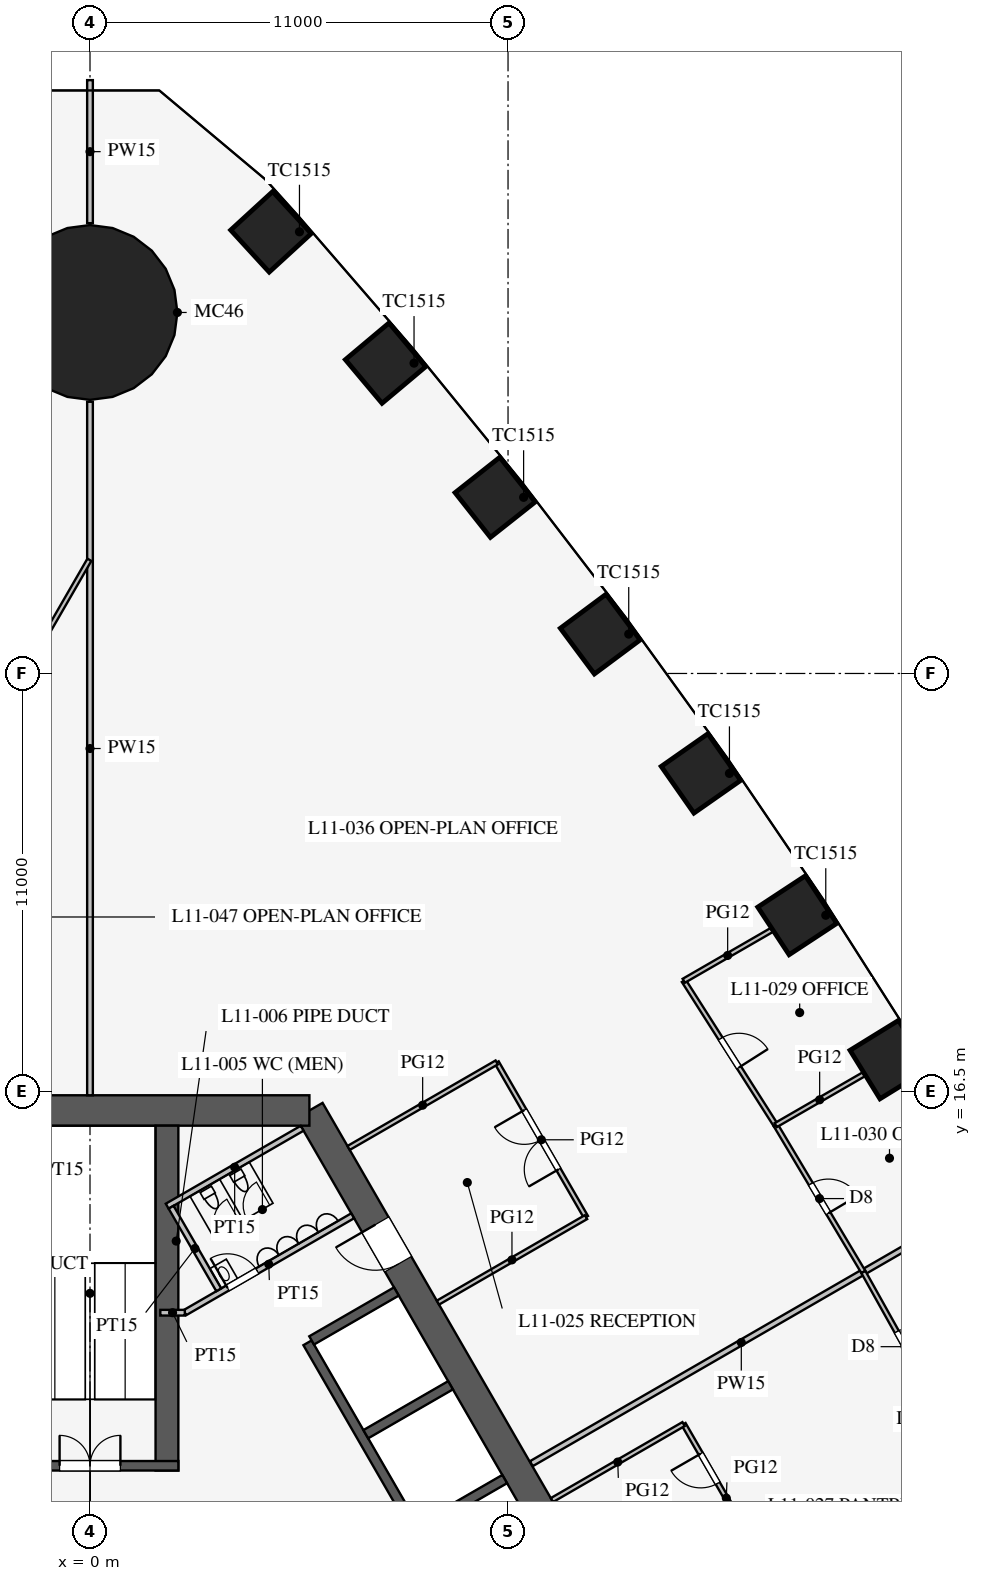
"""IFC4 building model, lengths in metres.
Left out: names, types, materials, properties, quantities, classifications, styles, units other than length and angle.
Written with IfcOpenShell. Run it as: python <this file> out.ifc"""

import sys

from ifc_helpers import new_model, si_unit, direction, frame, frame_2d, origin, origin_2d, place, context, subcontext, project, spatial, rectangle, circle, extrude, element, fill, save


model = new_model("IFC4")
c1 = context("Model", 3, precision=1e-05, world=origin(), true_north=direction((0.0, 1.0)))
c2 = subcontext(c1, "Body", "Model", "MODEL_VIEW")
j1 = project(units=[si_unit("LENGTHUNIT", "METRE"), si_unit("PLANEANGLEUNIT", "RADIAN")], contexts=[c1])
p1 = place(None, origin())
s1 = spatial("IfcSite", under=j1, at=p1, CompositionType="ELEMENT")
p2 = place(p1, origin())
s2 = spatial("IfcBuilding", under=s1, at=p2, CompositionType="ELEMENT")
p3 = place(p2, frame((0.0, 0.0, 50.1)))
s3 = spatial("IfcBuildingStorey", under=s2, at=p3, CompositionType="ELEMENT", Elevation=50.1)
for number, where, z_axis, x_axis in (
    (1, (21.031, 17.339, 0.0), (0.0, 0.0, 1.0), (-0.525, 0.851, 0.0)),
    (2, (18.611, 21.137, 0.0), (0.0, 0.0, 1.0), (-0.549, 0.836, 0.0)),
    (3, (16.076, 24.87, 0.0), (0.0, 0.0, 1.0), (-0.574, 0.819, 0.0)),
    (4, (13.426, 28.536, 0.0), (0.0, 0.0, 1.0), (-0.597, 0.802, 0.0)),
    (5, (10.66, 32.135, 0.0), (0.0, 0.0, 1.0), (-0.62, 0.784, 0.0)),
    (6, (7.776, 35.667, 0.0), (0.0, 0.0, 1.0), (-0.643, 0.766, 0.0)),
    (7, (4.762, 39.122, 0.0), (0.0, 0.0, 1.0), (-0.676, 0.737, 0.0)),
):
    element("IfcColumn", number, at=place(p3, frame(where, z_axis=z_axis, x_axis=x_axis)), inside=s3, PredefinedType="COLUMN", context=c2, shape_type="SweptSolid", body=[
        extrude(rectangle(XDim=1.5, YDim=1.5, at=origin_2d()), origin(), (0.0, 0.0, 1.0), 4.2),
    ])
p4 = place(p3, frame((0.0, 37.0, 0.0), z_axis=(0.0, 0.0, 1.0), x_axis=(1.0, 0.0, 0.0)))
e8 = element("IfcColumn", 8, at=p4, inside=s3, PredefinedType="COLUMN", context=c2, shape_type="SweptSolid", body=[
    extrude(circle(Radius=2.3, at=origin_2d()), origin(), (0.0, 0.0, 1.0), 4.2),
])
p5 = place(p3, frame((16.743, -3.0, 0.0), z_axis=(0.0, 0.0, 1.0), x_axis=(-0.500002442456, 0.866023993627, 0.0)))
e9 = element("IfcWall", 9, at=p5, inside=s3, PredefinedType="SHEAR", context=c2, shape_type="SweptSolid", body=[
    extrude(rectangle(XDim=21.939, YDim=0.8, at=frame_2d((10.97, 0.0))), origin(), (0.0, 0.0, 1.0), 4.2),
])
p6 = place(p5, frame((17.27, 0.0, 0.0)))
e10 = element("IfcOpeningElement", 10, at=p6, cuts=e9, PredefinedType="OPENING", context=c2, shape_type="SweptSolid", body=[
    extrude(rectangle(XDim=1.2, YDim=2.1, at=frame_2d((0.6, 1.05))), frame((0.0, 0.41, 0.0), z_axis=(0.0, -1.0, 0.0), x_axis=(1.0, 0.0, 0.0)), (0.0, 0.0, 1.0), 0.82),
])
p7 = place(p5, frame((3.47, 0.0, 0.0)))
e11 = element("IfcOpeningElement", 11, at=p7, cuts=e9, PredefinedType="OPENING", context=c2, shape_type="SweptSolid", body=[
    extrude(rectangle(XDim=1.2, YDim=2.1, at=frame_2d((0.6, 1.05))), frame((0.0, 0.41, 0.0), z_axis=(0.0, -1.0, 0.0), x_axis=(1.0, 0.0, 0.0)), (0.0, 0.0, 1.0), 0.82),
])
p8 = place(p3, frame((5.773, 16.0, 0.0), z_axis=(0.0, 0.0, 1.0), x_axis=(-1.0, 0.0, 0.0)))
e12 = element("IfcWall", 12, at=p8, inside=s3, PredefinedType="SHEAR", context=c2, shape_type="SweptSolid", body=[
    extrude(rectangle(XDim=11.547, YDim=0.8, at=frame_2d((5.773, 0.0))), origin(), (0.0, 0.0, 1.0), 4.2),
])
p9 = place(p3, frame((11.424, 0.014, 0.0), z_axis=(0.0, 0.0, 1.0), x_axis=(-0.500001763848, 0.866024385424, 0.0)))
e13 = element("IfcWall", 13, at=p9, inside=s3, PredefinedType="SHEAR", context=c2, shape_type="SweptSolid", body=[
    extrude(rectangle(XDim=11.4, YDim=0.25, at=frame_2d((5.7, 0.0))), origin(), (0.0, 0.0, 1.0), 4.2),
])
for number, where, z_axis, x_axis in (
    (14, (8.682, 5.012, 0.0), (0.0, 0.0, 1.0), (0.866, 0.5, 0.0)),
    (15, (7.257, 7.481, 0.0), (0.0, 0.0, 1.0), (0.866, 0.5, 0.0)),
):
    element("IfcWall", number, at=place(p3, frame(where, z_axis=z_axis, x_axis=x_axis)), inside=s3, PredefinedType="SHEAR", context=c2, shape_type="SweptSolid", body=[
        extrude(rectangle(XDim=2.575, YDim=0.25, at=frame_2d((1.288, 0.0))), origin(), (0.0, 0.0, 1.0), 4.2),
    ])
p10 = place(p3, frame((5.832, 9.949, 0.0), z_axis=(0.0, 0.0, 1.0), x_axis=(0.866029291668, 0.499993265928, 0.0)))
e16 = element("IfcWall", 16, at=p10, inside=s3, PredefinedType="SHEAR", context=c2, shape_type="SweptSolid", body=[
    extrude(rectangle(XDim=2.575, YDim=0.25, at=frame_2d((1.288, 0.0))), origin(), (0.0, 0.0, 1.0), 4.2),
])
p11 = place(p3, frame((2.025, 6.525, 0.0), z_axis=(0.0, 0.0, 1.0), x_axis=(0.0, 1.0, 0.0)))
e17 = element("IfcWall", 17, at=p11, inside=s3, PredefinedType="SHEAR", context=c2, shape_type="SweptSolid", body=[
    extrude(rectangle(XDim=9.075, YDim=0.6, at=frame_2d((4.538, 0.0))), origin(), (0.0, 0.0, 1.0), 4.2),
])
p12 = place(p3, frame((2.325, 6.65, 0.0), z_axis=(0.0, 0.0, 1.0), x_axis=(-1.0, 0.0, 0.0)))
e18 = element("IfcWall", 18, at=p12, inside=s3, PredefinedType="SHEAR", context=c2, shape_type="SweptSolid", body=[
    extrude(rectangle(XDim=4.65, YDim=0.25, at=frame_2d((2.325, 0.0))), origin(), (0.0, 0.0, 1.0), 4.2),
])
p13 = place(p12, frame((1.525, 0.0, 0.0)))
e19 = element("IfcOpeningElement", 19, at=p13, cuts=e18, PredefinedType="OPENING", context=c2, shape_type="SweptSolid", body=[
    extrude(rectangle(XDim=1.6, YDim=2.1, at=frame_2d((0.8, 1.05))), frame((0.0, 0.135, 0.0), z_axis=(0.0, -1.0, 0.0), x_axis=(1.0, 0.0, 0.0)), (0.0, 0.0, 1.0), 0.27),
])
p14 = place(p3, frame((2.495, 10.678, 0.0), z_axis=(0.0, 0.0, 1.0), x_axis=(0.86602216432, 0.500005610874, 0.0)))
e20 = element("IfcWall", 20, at=p14, inside=s3, PredefinedType="PARTITIONING", context=c2, shape_type="SweptSolid", body=[
    extrude(rectangle(XDim=5.1, YDim=0.15, at=frame_2d((2.55, 0.0))), origin(), (0.0, 0.0, 1.0), 4.0),
])
p15 = place(p14, frame((1.3, 0.0, 0.0)))
e21 = element("IfcOpeningElement", 21, at=p15, cuts=e20, PredefinedType="OPENING", context=c2, shape_type="SweptSolid", body=[
    extrude(rectangle(XDim=0.9, YDim=2.1, at=frame_2d((0.45, 1.05))), frame((0.0, 0.085, 0.0), z_axis=(0.0, -1.0, 0.0), x_axis=(1.0, 0.0, 0.0)), (0.0, 0.0, 1.0), 0.17),
])
p16 = place(p3, frame((2.495, 10.678, 0.0), z_axis=(0.0, 0.0, 1.0), x_axis=(-1.0, 0.0, 0.0)))
e22 = element("IfcWall", 22, at=p16, inside=s3, PredefinedType="PARTITIONING", context=c2, shape_type="SweptSolid", body=[
    extrude(rectangle(XDim=0.645, YDim=0.15, at=frame_2d((0.323, 0.0))), origin(), (0.0, 0.0, 1.0), 4.0),
])
p17 = place(p3, frame((2.031, 13.482, 0.0), z_axis=(0.0, 0.0, 1.0), x_axis=(0.866050731258, 0.499956128963, 0.0)))
e23 = element("IfcWall", 23, at=p17, inside=s3, PredefinedType="PARTITIONING", context=c2, shape_type="SweptSolid", body=[
    extrude(rectangle(XDim=4.1, YDim=0.15, at=frame_2d((2.05, 0.0))), origin(), (0.0, 0.0, 1.0), 4.0),
])
p18 = place(p3, frame((3.389, 11.281, 0.0), z_axis=(0.0, 0.0, 1.0), x_axis=(-0.499989096993, 0.866031698547, 0.0)))
e24 = element("IfcWall", 24, at=p18, inside=s3, PredefinedType="PARTITIONING", context=c2, shape_type="SweptSolid", body=[
    extrude(rectangle(XDim=2.51, YDim=0.15, at=frame_2d((1.255, 0.0))), origin(), (0.0, 0.0, 1.0), 4.0),
])
p19 = place(p3, frame((0.0, 16.4, 0.0), z_axis=(0.0, 0.0, 1.0), x_axis=(0.0, 1.0, 0.0)))
e25 = element("IfcWall", 25, at=p19, inside=s3, PredefinedType="PARTITIONING", context=c2, shape_type="SweptSolid", body=[
    extrude(rectangle(XDim=18.25, YDim=0.15, at=frame_2d((9.125, 0.0))), origin(), (0.0, 0.0, 1.0), 2.3),
])
p20 = place(p3, frame((0.0, 39.35, 0.0), z_axis=(0.0, 0.0, 1.0), x_axis=(0.0, 1.0, 0.0)))
e26 = element("IfcWall", 26, at=p20, inside=s3, PredefinedType="PARTITIONING", context=c2, shape_type="SweptSolid", body=[
    extrude(rectangle(XDim=3.764, YDim=0.15, at=frame_2d((1.882, 0.0))), origin(), (0.0, 0.0, 1.0), 2.3),
])
p21 = place(p3, frame((11.613, 6.705, 0.0), z_axis=(0.0, 0.0, 1.0), x_axis=(0.86602785495, 0.499995754432, 0.0)))
e27 = element("IfcWall", 27, at=p21, inside=s3, PredefinedType="PARTITIONING", context=c2, shape_type="SweptSolid", body=[
    extrude(rectangle(XDim=12.759, YDim=0.15, at=frame_2d((6.379, 0.0))), origin(), (0.0, 0.0, 1.0), 3.2),
])
p22 = place(p3, frame((13.052, 13.194, 0.0), z_axis=(0.0, 0.0, 1.0), x_axis=(-0.499977259774, 0.866038532462, 0.0)))
e28 = element("IfcWall", 28, at=p22, inside=s3, PredefinedType="PARTITIONING", context=c2, shape_type="SweptSolid", body=[
    extrude(rectangle(XDim=4.7, YDim=0.12, at=frame_2d((2.35, 0.0))), origin(), (0.0, 0.0, 1.0), 2.9),
])
p23 = place(p22, frame((1.45, 0.0, 0.15)))
e29 = element("IfcOpeningElement", 29, at=p23, cuts=e28, PredefinedType="OPENING", context=c2, shape_type="SweptSolid", body=[
    extrude(rectangle(XDim=1.8, YDim=2.1, at=frame_2d((0.9, 1.05))), frame((0.0, 0.07, 0.0), z_axis=(0.0, -1.0, 0.0), x_axis=(1.0, 0.0, 0.0)), (0.0, 0.0, 1.0), 0.14),
])
p24 = place(p3, frame((16.969, 5.409, 0.0), z_axis=(0.0, 0.0, 1.0), x_axis=(-0.499980770555, 0.866036505625, 0.0)))
e30 = element("IfcWall", 30, at=p24, inside=s3, PredefinedType="PARTITIONING", context=c2, shape_type="SweptSolid", body=[
    extrude(rectangle(XDim=2.7, YDim=0.12, at=frame_2d((1.35, 0.0))), origin(), (0.0, 0.0, 1.0), 2.9),
])
p25 = place(p24, frame((0.9, 0.0, 0.15)))
e31 = element("IfcOpeningElement", 31, at=p25, cuts=e30, PredefinedType="OPENING", context=c2, shape_type="SweptSolid", body=[
    extrude(rectangle(XDim=0.9, YDim=2.1, at=frame_2d((0.45, 1.05))), frame((0.0, 0.07, 0.0), z_axis=(0.0, -1.0, 0.0), x_axis=(1.0, 0.0, 0.0)), (0.0, 0.0, 1.0), 0.14),
])
p26 = place(p3, frame((9.155, 10.944, 0.0), z_axis=(0.0, 0.0, 1.0), x_axis=(0.866017533419, 0.500013631625, 0.0)))
e32 = element("IfcWall", 32, at=p26, inside=s3, PredefinedType="PARTITIONING", context=c2, shape_type="SweptSolid", body=[
    extrude(rectangle(XDim=4.5, YDim=0.12, at=frame_2d((2.25, 0.0))), origin(), (0.0, 0.0, 1.0), 2.9),
])
p27 = place(p3, frame((6.805, 15.014, 0.0), z_axis=(0.0, 0.0, 1.0), x_axis=(0.866031096941, 0.499990139034, 0.0)))
e33 = element("IfcWall", 33, at=p27, inside=s3, PredefinedType="PARTITIONING", context=c2, shape_type="SweptSolid", body=[
    extrude(rectangle(XDim=4.5, YDim=0.12, at=frame_2d((2.25, 0.0))), origin(), (0.0, 0.0, 1.0), 2.9),
])
p28 = place(p3, frame((12.155, 5.747, 0.0), z_axis=(0.0, 0.0, 1.0), x_axis=(0.866026010844, 0.49999894854, 0.0)))
e34 = element("IfcWall", 34, at=p28, inside=s3, PredefinedType="PARTITIONING", context=c2, shape_type="SweptSolid", body=[
    extrude(rectangle(XDim=4.0, YDim=0.12, at=frame_2d((2.0, 0.0))), origin(), (0.0, 0.0, 1.0), 2.9),
])
p29 = place(p3, frame((20.351, 11.749, 0.0), z_axis=(0.0, 0.0, 1.0), x_axis=(-0.51252396108, 0.858672923364, 0.0)))
e35 = element("IfcWall", 35, at=p29, inside=s3, PredefinedType="PARTITIONING", context=c2, shape_type="SweptSolid", body=[
    extrude(rectangle(XDim=4.5, YDim=0.12, at=frame_2d((2.25, 0.0))), origin(), (0.0, 0.0, 1.0), 2.9),
])
p30 = place(p29, frame((1.8, 0.0, 0.15)))
e36 = element("IfcOpeningElement", 36, at=p30, cuts=e35, PredefinedType="OPENING", context=c2, shape_type="SweptSolid", body=[
    extrude(rectangle(XDim=0.9, YDim=2.1, at=frame_2d((0.45, 1.05))), frame((0.0, 0.07, 0.0), z_axis=(0.0, -1.0, 0.0), x_axis=(1.0, 0.0, 0.0)), (0.0, 0.0, 1.0), 0.14),
])
p31 = place(p3, frame((18.044, 15.614, 0.0), z_axis=(0.0, 0.0, 1.0), x_axis=(-0.537243691336, 0.843427066272, 0.0)))
e37 = element("IfcWall", 37, at=p31, inside=s3, PredefinedType="PARTITIONING", context=c2, shape_type="SweptSolid", body=[
    extrude(rectangle(XDim=4.504, YDim=0.12, at=frame_2d((2.252, 0.0))), origin(), (0.0, 0.0, 1.0), 2.9),
])
p32 = place(p31, frame((1.8, 0.0, 0.15)))
e38 = element("IfcOpeningElement", 38, at=p32, cuts=e37, PredefinedType="OPENING", context=c2, shape_type="SweptSolid", body=[
    extrude(rectangle(XDim=0.9, YDim=2.1, at=frame_2d((0.45, 1.05))), frame((0.0, 0.07, 0.0), z_axis=(0.0, -1.0, 0.0), x_axis=(1.0, 0.0, 0.0)), (0.0, 0.0, 1.0), 0.14),
])
p33 = place(p3, frame((22.544, 7.82, 0.0), z_axis=(0.0, 0.0, 1.0), x_axis=(-0.487373854787, 0.873193406795, 0.0)))
e39 = element("IfcWall", 39, at=p33, inside=s3, PredefinedType="PARTITIONING", context=c2, shape_type="SweptSolid", body=[
    extrude(rectangle(XDim=4.5, YDim=0.12, at=frame_2d((2.25, 0.0))), origin(), (0.0, 0.0, 1.0), 2.9),
])
p34 = place(p33, frame((1.8, 0.0, 0.15)))
e40 = element("IfcOpeningElement", 40, at=p34, cuts=e39, PredefinedType="OPENING", context=c2, shape_type="SweptSolid", body=[
    extrude(rectangle(XDim=0.9, YDim=2.1, at=frame_2d((0.45, 1.05))), frame((0.0, 0.07, 0.0), z_axis=(0.0, -1.0, 0.0), x_axis=(1.0, 0.0, 0.0)), (0.0, 0.0, 1.0), 0.14),
])
p35 = place(p3, frame((18.044, 15.614, 0.0), z_axis=(0.0, 0.0, 1.0), x_axis=(0.866022619654, 0.500004822225, 0.0)))
e41 = element("IfcWall", 41, at=p35, inside=s3, PredefinedType="PARTITIONING", context=c2, shape_type="SweptSolid", body=[
    extrude(rectangle(XDim=2.669, YDim=0.12, at=frame_2d((1.335, 0.0))), origin(), (0.0, 0.0, 1.0), 2.9),
])
p36 = place(p3, frame((15.624, 19.413, 0.0), z_axis=(0.0, 0.0, 1.0), x_axis=(0.866020974757, 0.500007671222, 0.0)))
e42 = element("IfcWall", 42, at=p36, inside=s3, PredefinedType="PARTITIONING", context=c2, shape_type="SweptSolid", body=[
    extrude(rectangle(XDim=2.667, YDim=0.12, at=frame_2d((1.334, 0.0))), origin(), (0.0, 0.0, 1.0), 2.9),
])
p37 = place(p3, frame((-0.016, 30.491, 0.0), z_axis=(0.0, 0.0, 1.0), x_axis=(-0.50000091641, -0.866024874695, 0.0)))
e43 = element("IfcWall", 43, at=p37, inside=s3, PredefinedType="PARTITIONING", context=c2, shape_type="SweptSolid", body=[
    extrude(rectangle(XDim=52.796, YDim=0.12, at=frame_2d((26.398, 0.0))), origin(), (0.0, 0.0, 1.0), 2.9),
])
p38 = place(p37, frame((10.2, 0.0, 0.15)))
e44 = element("IfcOpeningElement", 44, at=p38, cuts=e43, PredefinedType="OPENING", context=c2, shape_type="SweptSolid", body=[
    extrude(rectangle(XDim=1.8, YDim=2.1, at=frame_2d((0.9, 1.05))), frame((0.0, 0.07, 0.0), z_axis=(0.0, -1.0, 0.0), x_axis=(1.0, 0.0, 0.0)), (0.0, 0.0, 1.0), 0.14),
])
p39 = place(p37, frame((40.8, 0.0, 0.15)))
e45 = element("IfcOpeningElement", 45, at=p39, cuts=e43, PredefinedType="OPENING", context=c2, shape_type="SweptSolid", body=[
    extrude(rectangle(XDim=1.8, YDim=2.1, at=frame_2d((0.9, 1.05))), frame((0.0, 0.07, 0.0), z_axis=(0.0, -1.0, 0.0), x_axis=(1.0, 0.0, 0.0)), (0.0, 0.0, 1.0), 0.14),
])
p40 = place(p15, origin())
e46 = element("IfcDoor", 46, at=p40, inside=s3, OperationType="SINGLE_SWING_LEFT", PredefinedType="DOOR", context=c2, shape_type="SweptSolid", body=[
    extrude(rectangle(XDim=0.9, YDim=2.1, at=frame_2d((0.45, 1.05))), frame((0.0, 0.025, 0.0), z_axis=(0.0, -1.0, 0.0), x_axis=(1.0, 0.0, 0.0)), (0.0, 0.0, 1.0), 0.05),
])
fill(e21, e46)
p41 = place(p13, frame((1.6, 0.0, 0.0), z_axis=(0.0, 0.0, 1.0), x_axis=(-1.0, 0.0, 0.0)))
e47 = element("IfcDoor", 47, at=p41, inside=s3, OperationType="DOUBLE_DOOR_SINGLE_SWING", PredefinedType="DOOR", context=c2, shape_type="SweptSolid", body=[
    extrude(rectangle(XDim=1.6, YDim=2.1, at=frame_2d((0.8, 1.05))), frame((0.0, 0.025, 0.0), z_axis=(0.0, -1.0, 0.0), x_axis=(1.0, 0.0, 0.0)), (0.0, 0.0, 1.0), 0.05),
])
fill(e19, e47)
p42 = place(p6, origin())
e48 = element("IfcDoor", 48, at=p42, inside=s3, OperationType="SINGLE_SWING_RIGHT", PredefinedType="DOOR", context=c2, shape_type="SweptSolid", body=[
    extrude(rectangle(XDim=1.2, YDim=2.1, at=frame_2d((0.6, 1.05))), frame((0.0, 0.025, 0.0), z_axis=(0.0, -1.0, 0.0), x_axis=(1.0, 0.0, 0.0)), (0.0, 0.0, 1.0), 0.05),
])
fill(e10, e48)
p43 = place(p23, origin())
e49 = element("IfcDoor", 49, at=p43, inside=s3, OperationType="DOUBLE_DOOR_SINGLE_SWING", PredefinedType="DOOR", context=c2, shape_type="SweptSolid", body=[
    extrude(rectangle(XDim=1.8, YDim=2.1, at=frame_2d((0.9, 1.05))), frame((0.0, 0.025, 0.0), z_axis=(0.0, -1.0, 0.0), x_axis=(1.0, 0.0, 0.0)), (0.0, 0.0, 1.0), 0.05),
])
fill(e29, e49)
p44 = place(p25, origin())
e50 = element("IfcDoor", 50, at=p44, inside=s3, OperationType="SINGLE_SWING_RIGHT", PredefinedType="DOOR", context=c2, shape_type="SweptSolid", body=[
    extrude(rectangle(XDim=0.9, YDim=2.1, at=frame_2d((0.45, 1.05))), frame((0.0, 0.025, 0.0), z_axis=(0.0, -1.0, 0.0), x_axis=(1.0, 0.0, 0.0)), (0.0, 0.0, 1.0), 0.05),
])
fill(e31, e50)
p45 = place(p32, frame((0.9, 0.0, 0.0), z_axis=(0.0, 0.0, 1.0), x_axis=(-1.0, 0.0, 0.0)))
e51 = element("IfcDoor", 51, at=p45, inside=s3, OperationType="SINGLE_SWING_RIGHT", PredefinedType="DOOR", context=c2, shape_type="SweptSolid", body=[
    extrude(rectangle(XDim=0.9, YDim=2.1, at=frame_2d((0.45, 1.05))), frame((0.0, 0.025, 0.0), z_axis=(0.0, -1.0, 0.0), x_axis=(1.0, 0.0, 0.0)), (0.0, 0.0, 1.0), 0.05),
])
fill(e38, e51)
p46 = place(p30, frame((0.9, 0.0, 0.0), z_axis=(0.0, 0.0, 1.0), x_axis=(-1.0, 0.0, 0.0)))
e52 = element("IfcDoor", 52, at=p46, inside=s3, OperationType="SINGLE_SWING_RIGHT", PredefinedType="DOOR", context=c2, shape_type="SweptSolid", body=[
    extrude(rectangle(XDim=0.9, YDim=2.1, at=frame_2d((0.45, 1.05))), frame((0.0, 0.025, 0.0), z_axis=(0.0, -1.0, 0.0), x_axis=(1.0, 0.0, 0.0)), (0.0, 0.0, 1.0), 0.05),
])
fill(e36, e52)
p47 = place(p34, frame((0.9, 0.0, 0.0), z_axis=(0.0, 0.0, 1.0), x_axis=(-1.0, 0.0, 0.0)))
e53 = element("IfcDoor", 53, at=p47, inside=s3, OperationType="SINGLE_SWING_RIGHT", PredefinedType="DOOR", context=c2, shape_type="SweptSolid", body=[
    extrude(rectangle(XDim=0.9, YDim=2.1, at=frame_2d((0.45, 1.05))), frame((0.0, 0.025, 0.0), z_axis=(0.0, -1.0, 0.0), x_axis=(1.0, 0.0, 0.0)), (0.0, 0.0, 1.0), 0.05),
])
fill(e40, e53)
save(model, sys.argv[1])
